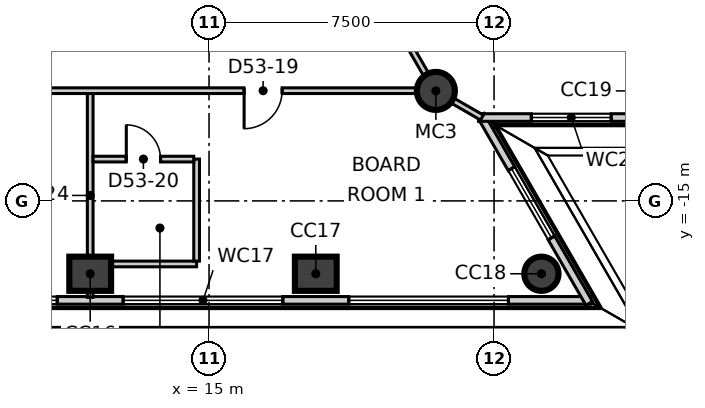
"""IFC4 building model, lengths in metres.
Left out: names, types, materials, properties, quantities, classifications, styles, units other than length and angle.
Written with IfcOpenShell. Run it as: python <this file> out.ifc"""

import sys

from ifc_helpers import new_model, si_unit, direction, frame, frame_2d, origin, origin_2d, place, context, subcontext, project, spatial, rectangle, circle, extrude, element, fill, save


model = new_model("IFC4")
c1 = context("Model", 3, precision=1e-05, world=origin(), true_north=direction((0.0, 1.0)))
c2 = subcontext(c1, "Body", "Model", "MODEL_VIEW")
j1 = project(units=[si_unit("LENGTHUNIT", "METRE"), si_unit("PLANEANGLEUNIT", "RADIAN")], contexts=[c1])
p1 = place(None, origin())
s1 = spatial("IfcSite", under=j1, at=p1, CompositionType="ELEMENT")
p2 = place(p1, origin())
s2 = spatial("IfcBuilding", under=s1, at=p2, CompositionType="ELEMENT")
p3 = place(p2, frame((0.0, 0.0, 227.3)))
s3 = spatial("IfcBuildingStorey", under=s2, at=p3, CompositionType="ELEMENT", Elevation=227.3)
for number, where, z_axis, x_axis in (
    (1, (11.873, -16.917, -0.3), (0.0, 0.0, 1.0), (1.0, 0.0, 0.0)),
    (2, (17.809, -16.917, -0.3), (0.0, 0.0, 1.0), (1.0, 0.0, 0.0)),
):
    element("IfcColumn", number, at=place(p3, frame(where, z_axis=z_axis, x_axis=x_axis)), inside=s3, PredefinedType="COLUMN", context=c2, shape_type="SweptSolid", body=[
        extrude(rectangle(XDim=1.1, YDim=0.9, at=origin_2d()), origin(), (0.0, 0.0, 1.0), 4.0),
    ])
p4 = place(p3, frame((23.746, -16.917, -0.3), z_axis=(0.0, 0.0, 1.0), x_axis=(1.0, 0.0, 0.0)))
e3 = element("IfcColumn", 3, at=p4, inside=s3, PredefinedType="COLUMN", context=c2, shape_type="SweptSolid", body=[
    extrude(circle(Radius=0.45, at=origin_2d()), origin(), (0.0, 0.0, 1.0), 4.0),
])
p5 = place(p3, frame((20.969, -12.106, -0.3), z_axis=(0.0, 0.0, 1.0), x_axis=(1.0, 0.0, 0.0)))
e4 = element("IfcColumn", 4, at=p5, inside=s3, PredefinedType="COLUMN", context=c2, shape_type="SweptSolid", body=[
    extrude(circle(Radius=0.5, at=origin_2d()), origin(), (0.0, 0.0, 1.0), 4.0),
])
p6 = place(p3, frame((-25.049, -17.617, 0.0), z_axis=(0.0, 0.0, 1.0), x_axis=(1.0, 0.0, 0.0)))
e5 = element("IfcWall", 5, at=p6, inside=s3, PredefinedType="ELEMENTEDWALL", context=c2, shape_type="SweptSolid", body=[
    extrude(rectangle(XDim=50.078, YDim=0.2, at=frame_2d((25.039, 0.0))), origin(), (0.0, 0.0, 1.0), 3.7),
])
p7 = place(p6, frame((2.171, 0.0, 0.9)))
e6 = element("IfcOpeningElement", 6, at=p7, cuts=e5, PredefinedType="OPENING", context=c2, shape_type="SweptSolid", body=[
    extrude(rectangle(XDim=4.2, YDim=2.5, at=frame_2d((2.1, 1.25))), frame((0.0, 0.11, 0.0), z_axis=(0.0, -1.0, 0.0), x_axis=(1.0, 0.0, 0.0)), (0.0, 0.0, 1.0), 0.22),
])
p8 = place(p6, frame((8.108, 0.0, 0.9)))
e7 = element("IfcOpeningElement", 7, at=p8, cuts=e5, PredefinedType="OPENING", context=c2, shape_type="SweptSolid", body=[
    extrude(rectangle(XDim=4.2, YDim=2.5, at=frame_2d((2.1, 1.25))), frame((0.0, 0.11, 0.0), z_axis=(0.0, -1.0, 0.0), x_axis=(1.0, 0.0, 0.0)), (0.0, 0.0, 1.0), 0.22),
])
p9 = place(p6, frame((14.044, 0.0, 0.9)))
e8 = element("IfcOpeningElement", 8, at=p9, cuts=e5, PredefinedType="OPENING", context=c2, shape_type="SweptSolid", body=[
    extrude(rectangle(XDim=4.2, YDim=2.5, at=frame_2d((2.1, 1.25))), frame((0.0, 0.11, 0.0), z_axis=(0.0, -1.0, 0.0), x_axis=(1.0, 0.0, 0.0)), (0.0, 0.0, 1.0), 0.22),
])
p10 = place(p6, frame((19.981, 0.0, 0.9)))
e9 = element("IfcOpeningElement", 9, at=p10, cuts=e5, PredefinedType="OPENING", context=c2, shape_type="SweptSolid", body=[
    extrude(rectangle(XDim=4.2, YDim=2.5, at=frame_2d((2.1, 1.25))), frame((0.0, 0.11, 0.0), z_axis=(0.0, -1.0, 0.0), x_axis=(1.0, 0.0, 0.0)), (0.0, 0.0, 1.0), 0.22),
])
p11 = place(p6, frame((25.917, 0.0, 0.9)))
e10 = element("IfcOpeningElement", 10, at=p11, cuts=e5, PredefinedType="OPENING", context=c2, shape_type="SweptSolid", body=[
    extrude(rectangle(XDim=4.2, YDim=2.5, at=frame_2d((2.1, 1.25))), frame((0.0, 0.11, 0.0), z_axis=(0.0, -1.0, 0.0), x_axis=(1.0, 0.0, 0.0)), (0.0, 0.0, 1.0), 0.22),
])
p12 = place(p6, frame((31.854, 0.0, 0.9)))
e11 = element("IfcOpeningElement", 11, at=p12, cuts=e5, PredefinedType="OPENING", context=c2, shape_type="SweptSolid", body=[
    extrude(rectangle(XDim=4.2, YDim=2.5, at=frame_2d((2.1, 1.25))), frame((0.0, 0.11, 0.0), z_axis=(0.0, -1.0, 0.0), x_axis=(1.0, 0.0, 0.0)), (0.0, 0.0, 1.0), 0.22),
])
p13 = place(p6, frame((37.79, 0.0, 0.9)))
e12 = element("IfcOpeningElement", 12, at=p13, cuts=e5, PredefinedType="OPENING", context=c2, shape_type="SweptSolid", body=[
    extrude(rectangle(XDim=4.2, YDim=2.5, at=frame_2d((2.1, 1.25))), frame((0.0, 0.11, 0.0), z_axis=(0.0, -1.0, 0.0), x_axis=(1.0, 0.0, 0.0)), (0.0, 0.0, 1.0), 0.22),
])
p14 = place(p6, frame((43.727, 0.0, 0.9)))
e13 = element("IfcOpeningElement", 13, at=p14, cuts=e5, PredefinedType="OPENING", context=c2, shape_type="SweptSolid", body=[
    extrude(rectangle(XDim=4.2, YDim=2.5, at=frame_2d((2.1, 1.25))), frame((0.0, 0.11, 0.0), z_axis=(0.0, -1.0, 0.0), x_axis=(1.0, 0.0, 0.0)), (0.0, 0.0, 1.0), 0.22),
])
p15 = place(p3, frame((25.004, -17.695, 0.0), z_axis=(0.0, 0.0, 1.0), x_axis=(-0.49987899677, 0.866095253761, 0.0)))
e14 = element("IfcWall", 14, at=p15, inside=s3, PredefinedType="ELEMENTEDWALL", context=c2, shape_type="SweptSolid", body=[
    extrude(rectangle(XDim=5.715, YDim=0.2, at=frame_2d((2.858, 0.0))), origin(), (0.0, 0.0, 1.0), 3.7),
])
p16 = place(p15, frame((1.99, 0.0, 0.9)))
e15 = element("IfcOpeningElement", 15, at=p16, cuts=e14, PredefinedType="OPENING", context=c2, shape_type="SweptSolid", body=[
    extrude(rectangle(XDim=2.1, YDim=2.5, at=frame_2d((1.05, 1.25))), frame((0.0, 0.11, 0.0), z_axis=(0.0, -1.0, 0.0), x_axis=(1.0, 0.0, 0.0)), (0.0, 0.0, 1.0), 0.22),
])
p17 = place(p3, frame((22.092, -12.806, 0.0), z_axis=(0.0, 0.0, 1.0), x_axis=(1.0, 0.0, 0.0)))
e16 = element("IfcWall", 16, at=p17, inside=s3, PredefinedType="ELEMENTEDWALL", context=c2, shape_type="SweptSolid", body=[
    extrude(rectangle(XDim=5.715, YDim=0.2, at=frame_2d((2.857, 0.0))), origin(), (0.0, 0.0, 1.0), 3.7),
])
p18 = place(p17, frame((1.39, 0.0, 0.9)))
e17 = element("IfcOpeningElement", 17, at=p18, cuts=e16, PredefinedType="OPENING", context=c2, shape_type="SweptSolid", body=[
    extrude(rectangle(XDim=2.1, YDim=2.5, at=frame_2d((1.05, 1.25))), frame((0.0, 0.11, 0.0), z_axis=(0.0, -1.0, 0.0), x_axis=(1.0, 0.0, 0.0)), (0.0, 0.0, 1.0), 0.22),
])
p19 = place(p3, frame((27.782, -12.884, 0.0), z_axis=(0.0, 0.0, 1.0), x_axis=(-0.500023345841, 0.866011924637, 0.0)))
e18 = element("IfcWall", 18, at=p19, inside=s3, PredefinedType="ELEMENTEDWALL", context=c2, shape_type="SweptSolid", body=[
    extrude(rectangle(XDim=50.078, YDim=0.2, at=frame_2d((25.039, 0.0))), origin(), (0.0, 0.0, 1.0), 3.7),
])
p20 = place(p19, frame((2.171, 0.0, 0.9)))
e19 = element("IfcOpeningElement", 19, at=p20, cuts=e18, PredefinedType="OPENING", context=c2, shape_type="SweptSolid", body=[
    extrude(rectangle(XDim=4.2, YDim=2.5, at=frame_2d((2.1, 1.25))), frame((0.0, 0.11, 0.0), z_axis=(0.0, -1.0, 0.0), x_axis=(1.0, 0.0, 0.0)), (0.0, 0.0, 1.0), 0.22),
])
p21 = place(p19, frame((8.108, 0.0, 0.9)))
e20 = element("IfcOpeningElement", 20, at=p21, cuts=e18, PredefinedType="OPENING", context=c2, shape_type="SweptSolid", body=[
    extrude(rectangle(XDim=4.2, YDim=2.5, at=frame_2d((2.1, 1.25))), frame((0.0, 0.11, 0.0), z_axis=(0.0, -1.0, 0.0), x_axis=(1.0, 0.0, 0.0)), (0.0, 0.0, 1.0), 0.22),
])
p22 = place(p19, frame((14.044, 0.0, 0.9)))
e21 = element("IfcOpeningElement", 21, at=p22, cuts=e18, PredefinedType="OPENING", context=c2, shape_type="SweptSolid", body=[
    extrude(rectangle(XDim=4.2, YDim=2.5, at=frame_2d((2.1, 1.25))), frame((0.0, 0.11, 0.0), z_axis=(0.0, -1.0, 0.0), x_axis=(1.0, 0.0, 0.0)), (0.0, 0.0, 1.0), 0.22),
])
p23 = place(p19, frame((19.981, 0.0, 0.9)))
e22 = element("IfcOpeningElement", 22, at=p23, cuts=e18, PredefinedType="OPENING", context=c2, shape_type="SweptSolid", body=[
    extrude(rectangle(XDim=4.2, YDim=2.5, at=frame_2d((2.1, 1.25))), frame((0.0, 0.11, 0.0), z_axis=(0.0, -1.0, 0.0), x_axis=(1.0, 0.0, 0.0)), (0.0, 0.0, 1.0), 0.22),
])
p24 = place(p19, frame((25.917, 0.0, 0.9)))
e23 = element("IfcOpeningElement", 23, at=p24, cuts=e18, PredefinedType="OPENING", context=c2, shape_type="SweptSolid", body=[
    extrude(rectangle(XDim=4.2, YDim=2.5, at=frame_2d((2.1, 1.25))), frame((0.0, 0.11, 0.0), z_axis=(0.0, -1.0, 0.0), x_axis=(1.0, 0.0, 0.0)), (0.0, 0.0, 1.0), 0.22),
])
p25 = place(p19, frame((31.854, 0.0, 0.9)))
e24 = element("IfcOpeningElement", 24, at=p25, cuts=e18, PredefinedType="OPENING", context=c2, shape_type="SweptSolid", body=[
    extrude(rectangle(XDim=4.2, YDim=2.5, at=frame_2d((2.1, 1.25))), frame((0.0, 0.11, 0.0), z_axis=(0.0, -1.0, 0.0), x_axis=(1.0, 0.0, 0.0)), (0.0, 0.0, 1.0), 0.22),
])
p26 = place(p19, frame((37.79, 0.0, 0.9)))
e25 = element("IfcOpeningElement", 25, at=p26, cuts=e18, PredefinedType="OPENING", context=c2, shape_type="SweptSolid", body=[
    extrude(rectangle(XDim=4.2, YDim=2.5, at=frame_2d((2.1, 1.25))), frame((0.0, 0.11, 0.0), z_axis=(0.0, -1.0, 0.0), x_axis=(1.0, 0.0, 0.0)), (0.0, 0.0, 1.0), 0.22),
])
p27 = place(p19, frame((43.727, 0.0, 0.9)))
e26 = element("IfcOpeningElement", 26, at=p27, cuts=e18, PredefinedType="OPENING", context=c2, shape_type="SweptSolid", body=[
    extrude(rectangle(XDim=4.2, YDim=2.5, at=frame_2d((2.1, 1.25))), frame((0.0, 0.11, 0.0), z_axis=(0.0, -1.0, 0.0), x_axis=(1.0, 0.0, 0.0)), (0.0, 0.0, 1.0), 0.22),
])
p28 = place(p3, frame((-20.808, -12.1, 0.0), z_axis=(0.0, 0.0, 1.0), x_axis=(1.0, 0.0, 0.0)))
e27 = element("IfcWall", 27, at=p28, inside=s3, PredefinedType="PARTITIONING", context=c2, shape_type="SweptSolid", body=[
    extrude(rectangle(XDim=41.766, YDim=0.15, at=frame_2d((20.883, 0.0))), origin(), (0.0, 0.0, 1.0), 3.7),
])
p29 = place(p28, frame((3.8, 0.0, 0.0)))
e28 = element("IfcOpeningElement", 28, at=p29, cuts=e27, PredefinedType="OPENING", context=c2, shape_type="SweptSolid", body=[
    extrude(rectangle(XDim=1.1, YDim=2.1, at=frame_2d((0.55, 1.05))), frame((0.0, 0.085, 0.0), z_axis=(0.0, -1.0, 0.0), x_axis=(1.0, 0.0, 0.0)), (0.0, 0.0, 1.0), 0.17),
])
p30 = place(p28, frame((18.685, 0.0, 0.0)))
e29 = element("IfcOpeningElement", 29, at=p30, cuts=e27, PredefinedType="OPENING", context=c2, shape_type="SweptSolid", body=[
    extrude(rectangle(XDim=1.1, YDim=2.1, at=frame_2d((0.55, 1.05))), frame((0.0, 0.085, 0.0), z_axis=(0.0, -1.0, 0.0), x_axis=(1.0, 0.0, 0.0)), (0.0, 0.0, 1.0), 0.17),
])
p31 = place(p28, frame((10.085, 0.0, 0.0)))
e30 = element("IfcOpeningElement", 30, at=p31, cuts=e27, PredefinedType="OPENING", context=c2, shape_type="SweptSolid", body=[
    extrude(rectangle(XDim=0.9, YDim=2.1, at=frame_2d((0.45, 1.05))), frame((0.0, 0.085, 0.0), z_axis=(0.0, -1.0, 0.0), x_axis=(1.0, 0.0, 0.0)), (0.0, 0.0, 1.0), 0.17),
])
p32 = place(p28, frame((13.285, 0.0, 0.0)))
e31 = element("IfcOpeningElement", 31, at=p32, cuts=e27, PredefinedType="OPENING", context=c2, shape_type="SweptSolid", body=[
    extrude(rectangle(XDim=0.9, YDim=2.1, at=frame_2d((0.45, 1.05))), frame((0.0, 0.085, 0.0), z_axis=(0.0, -1.0, 0.0), x_axis=(1.0, 0.0, 0.0)), (0.0, 0.0, 1.0), 0.17),
])
p33 = place(p28, frame((15.985, 0.0, 0.0)))
e32 = element("IfcOpeningElement", 32, at=p33, cuts=e27, PredefinedType="OPENING", context=c2, shape_type="SweptSolid", body=[
    extrude(rectangle(XDim=1.0, YDim=2.1, at=frame_2d((0.5, 1.05))), frame((0.0, 0.085, 0.0), z_axis=(0.0, -1.0, 0.0), x_axis=(1.0, 0.0, 0.0)), (0.0, 0.0, 1.0), 0.17),
])
p34 = place(p28, frame((29.158, 0.0, 0.0)))
e33 = element("IfcOpeningElement", 33, at=p34, cuts=e27, PredefinedType="OPENING", context=c2, shape_type="SweptSolid", body=[
    extrude(rectangle(XDim=1.1, YDim=2.1, at=frame_2d((0.55, 1.05))), frame((0.0, 0.085, 0.0), z_axis=(0.0, -1.0, 0.0), x_axis=(1.0, 0.0, 0.0)), (0.0, 0.0, 1.0), 0.17),
])
p35 = place(p28, frame((22.158, 0.0, 0.0)))
e34 = element("IfcOpeningElement", 34, at=p35, cuts=e27, PredefinedType="OPENING", context=c2, shape_type="SweptSolid", body=[
    extrude(rectangle(XDim=0.9, YDim=2.1, at=frame_2d((0.45, 1.05))), frame((0.0, 0.085, 0.0), z_axis=(0.0, -1.0, 0.0), x_axis=(1.0, 0.0, 0.0)), (0.0, 0.0, 1.0), 0.17),
])
p36 = place(p28, frame((25.158, 0.0, 0.0)))
e35 = element("IfcOpeningElement", 35, at=p36, cuts=e27, PredefinedType="OPENING", context=c2, shape_type="SweptSolid", body=[
    extrude(rectangle(XDim=0.9, YDim=2.1, at=frame_2d((0.45, 1.05))), frame((0.0, 0.085, 0.0), z_axis=(0.0, -1.0, 0.0), x_axis=(1.0, 0.0, 0.0)), (0.0, 0.0, 1.0), 0.17),
])
p37 = place(p28, frame((36.731, 0.0, 0.0)))
e36 = element("IfcOpeningElement", 36, at=p37, cuts=e27, PredefinedType="OPENING", context=c2, shape_type="SweptSolid", body=[
    extrude(rectangle(XDim=1.0, YDim=2.1, at=frame_2d((0.5, 1.05))), frame((0.0, 0.085, 0.0), z_axis=(0.0, -1.0, 0.0), x_axis=(1.0, 0.0, 0.0)), (0.0, 0.0, 1.0), 0.17),
])
p38 = place(p3, frame((21.086, -12.175, 0.0), z_axis=(0.0, 0.0, 1.0), x_axis=(0.866143786764, -0.499794898583, 0.0)))
e37 = element("IfcWall", 37, at=p38, inside=s3, PredefinedType="PARTITIONING", context=c2, shape_type="SweptSolid", body=[
    extrude(rectangle(XDim=1.264, YDim=0.15, at=frame_2d((0.632, 0.0))), origin(), (0.0, 0.0, 1.0), 3.7),
])
p39 = place(p3, frame((0.075, 24.07, 0.0), z_axis=(0.0, 0.0, 1.0), x_axis=(0.49999939571, -0.866025752671, 0.0)))
e38 = element("IfcWall", 38, at=p39, inside=s3, PredefinedType="PARTITIONING", context=c2, shape_type="SweptSolid", body=[
    extrude(rectangle(XDim=41.614, YDim=0.15, at=frame_2d((20.807, 0.0))), origin(), (0.0, 0.0, 1.0), 3.7),
])
p40 = place(p39, frame((36.714, 0.0, 0.0)))
e39 = element("IfcOpeningElement", 39, at=p40, cuts=e38, PredefinedType="OPENING", context=c2, shape_type="SweptSolid", body=[
    extrude(rectangle(XDim=1.1, YDim=2.1, at=frame_2d((0.55, 1.05))), frame((0.0, 0.085, 0.0), z_axis=(0.0, -1.0, 0.0), x_axis=(1.0, 0.0, 0.0)), (0.0, 0.0, 1.0), 0.17),
])
p41 = place(p39, frame((21.831, 0.0, 0.0)))
e40 = element("IfcOpeningElement", 40, at=p41, cuts=e38, PredefinedType="OPENING", context=c2, shape_type="SweptSolid", body=[
    extrude(rectangle(XDim=1.1, YDim=2.1, at=frame_2d((0.55, 1.05))), frame((0.0, 0.085, 0.0), z_axis=(0.0, -1.0, 0.0), x_axis=(1.0, 0.0, 0.0)), (0.0, 0.0, 1.0), 0.17),
])
p42 = place(p39, frame((30.631, 0.0, 0.0)))
e41 = element("IfcOpeningElement", 41, at=p42, cuts=e38, PredefinedType="OPENING", context=c2, shape_type="SweptSolid", body=[
    extrude(rectangle(XDim=0.9, YDim=2.1, at=frame_2d((0.45, 1.05))), frame((0.0, 0.085, 0.0), z_axis=(0.0, -1.0, 0.0), x_axis=(1.0, 0.0, 0.0)), (0.0, 0.0, 1.0), 0.17),
])
p43 = place(p39, frame((27.431, 0.0, 0.0)))
e42 = element("IfcOpeningElement", 42, at=p43, cuts=e38, PredefinedType="OPENING", context=c2, shape_type="SweptSolid", body=[
    extrude(rectangle(XDim=0.9, YDim=2.1, at=frame_2d((0.45, 1.05))), frame((0.0, 0.085, 0.0), z_axis=(0.0, -1.0, 0.0), x_axis=(1.0, 0.0, 0.0)), (0.0, 0.0, 1.0), 0.17),
])
p44 = place(p39, frame((24.631, 0.0, 0.0)))
e43 = element("IfcOpeningElement", 43, at=p44, cuts=e38, PredefinedType="OPENING", context=c2, shape_type="SweptSolid", body=[
    extrude(rectangle(XDim=1.0, YDim=2.1, at=frame_2d((0.5, 1.05))), frame((0.0, 0.085, 0.0), z_axis=(0.0, -1.0, 0.0), x_axis=(1.0, 0.0, 0.0)), (0.0, 0.0, 1.0), 0.17),
])
p45 = place(p39, frame((14.358, 0.0, 0.0)))
e44 = element("IfcOpeningElement", 44, at=p45, cuts=e38, PredefinedType="OPENING", context=c2, shape_type="SweptSolid", body=[
    extrude(rectangle(XDim=1.1, YDim=2.1, at=frame_2d((0.55, 1.05))), frame((0.0, 0.085, 0.0), z_axis=(0.0, -1.0, 0.0), x_axis=(1.0, 0.0, 0.0)), (0.0, 0.0, 1.0), 0.17),
])
p46 = place(p39, frame((3.885, 0.0, 0.0)))
e45 = element("IfcOpeningElement", 45, at=p46, cuts=e38, PredefinedType="OPENING", context=c2, shape_type="SweptSolid", body=[
    extrude(rectangle(XDim=1.1, YDim=2.1, at=frame_2d((0.55, 1.05))), frame((0.0, 0.085, 0.0), z_axis=(0.0, -1.0, 0.0), x_axis=(1.0, 0.0, 0.0)), (0.0, 0.0, 1.0), 0.17),
])
p47 = place(p3, frame((11.873, -17.537, 0.0), z_axis=(0.0, 0.0, 1.0), x_axis=(0.0, 1.0, 0.0)))
e46 = element("IfcWall", 46, at=p47, inside=s3, PredefinedType="PARTITIONING", context=c2, shape_type="SweptSolid", body=[
    extrude(rectangle(XDim=5.362, YDim=0.15, at=frame_2d((2.681, 0.0))), origin(), (0.0, 0.0, 1.0), 3.7),
])
p48 = place(p3, frame((11.948, -16.659, 0.0), z_axis=(0.0, 0.0, 1.0), x_axis=(1.0, 0.0, 0.0)))
e47 = element("IfcWall", 47, at=p48, inside=s3, PredefinedType="PARTITIONING", context=c2, shape_type="SweptSolid", body=[
    extrude(rectangle(XDim=2.725, YDim=0.15, at=frame_2d((1.363, 0.0))), origin(), (0.0, 0.0, 1.0), 2.95),
])
p49 = place(p3, frame((14.673, -16.584, 0.0), z_axis=(0.0, 0.0, 1.0), x_axis=(0.0, 1.0, 0.0)))
e48 = element("IfcWall", 48, at=p49, inside=s3, PredefinedType="PARTITIONING", context=c2, shape_type="SweptSolid", body=[
    extrude(rectangle(XDim=2.684, YDim=0.15, at=frame_2d((1.342, 0.0))), origin(), (0.0, 0.0, 1.0), 3.7),
])
p50 = place(p3, frame((11.948, -13.9, 0.0), z_axis=(0.0, 0.0, 1.0), x_axis=(1.0, 0.0, 0.0)))
e49 = element("IfcWall", 49, at=p50, inside=s3, PredefinedType="PARTITIONING", context=c2, shape_type="SweptSolid", body=[
    extrude(rectangle(XDim=2.65, YDim=0.15, at=frame_2d((1.325, 0.0))), origin(), (0.0, 0.0, 1.0), 3.7),
])
p51 = place(p50, frame((0.875, 0.0, 0.0)))
e50 = element("IfcOpeningElement", 50, at=p51, cuts=e49, PredefinedType="OPENING", context=c2, shape_type="SweptSolid", body=[
    extrude(rectangle(XDim=0.9, YDim=2.1, at=frame_2d((0.45, 1.05))), frame((0.0, 0.085, 0.0), z_axis=(0.0, -1.0, 0.0), x_axis=(1.0, 0.0, 0.0)), (0.0, 0.0, 1.0), 0.17),
])
p52 = place(p12, origin())
e51 = element("IfcWindow", 51, at=p52, inside=s3, PartitioningType="SINGLE_PANEL", PredefinedType="WINDOW", context=c2, shape_type="SweptSolid", body=[
    extrude(rectangle(XDim=4.2, YDim=2.5, at=frame_2d((2.1, 1.25))), frame((0.0, 0.03, 0.0), z_axis=(0.0, -1.0, 0.0), x_axis=(1.0, 0.0, 0.0)), (0.0, 0.0, 1.0), 0.06),
])
fill(e11, e51)
p53 = place(p13, origin())
e52 = element("IfcWindow", 52, at=p53, inside=s3, PartitioningType="SINGLE_PANEL", PredefinedType="WINDOW", context=c2, shape_type="SweptSolid", body=[
    extrude(rectangle(XDim=4.2, YDim=2.5, at=frame_2d((2.1, 1.25))), frame((0.0, 0.03, 0.0), z_axis=(0.0, -1.0, 0.0), x_axis=(1.0, 0.0, 0.0)), (0.0, 0.0, 1.0), 0.06),
])
fill(e12, e52)
p54 = place(p14, origin())
e53 = element("IfcWindow", 53, at=p54, inside=s3, PartitioningType="SINGLE_PANEL", PredefinedType="WINDOW", context=c2, shape_type="SweptSolid", body=[
    extrude(rectangle(XDim=4.2, YDim=2.5, at=frame_2d((2.1, 1.25))), frame((0.0, 0.03, 0.0), z_axis=(0.0, -1.0, 0.0), x_axis=(1.0, 0.0, 0.0)), (0.0, 0.0, 1.0), 0.06),
])
fill(e13, e53)
p55 = place(p16, origin())
e54 = element("IfcWindow", 54, at=p55, inside=s3, PartitioningType="SINGLE_PANEL", PredefinedType="WINDOW", context=c2, shape_type="SweptSolid", body=[
    extrude(rectangle(XDim=2.1, YDim=2.5, at=frame_2d((1.05, 1.25))), frame((0.0, 0.03, 0.0), z_axis=(0.0, -1.0, 0.0), x_axis=(1.0, 0.0, 0.0)), (0.0, 0.0, 1.0), 0.06),
])
fill(e15, e54)
p56 = place(p18, origin())
e55 = element("IfcWindow", 55, at=p56, inside=s3, PartitioningType="SINGLE_PANEL", PredefinedType="WINDOW", context=c2, shape_type="SweptSolid", body=[
    extrude(rectangle(XDim=2.1, YDim=2.5, at=frame_2d((1.05, 1.25))), frame((0.0, 0.03, 0.0), z_axis=(0.0, -1.0, 0.0), x_axis=(1.0, 0.0, 0.0)), (0.0, 0.0, 1.0), 0.06),
])
fill(e17, e55)
p57 = place(p37, origin())
e56 = element("IfcDoor", 56, at=p57, inside=s3, OperationType="SINGLE_SWING_LEFT", PredefinedType="DOOR", context=c2, shape_type="SweptSolid", body=[
    extrude(rectangle(XDim=1.0, YDim=2.1, at=frame_2d((0.5, 1.05))), frame((0.0, 0.025, 0.0), z_axis=(0.0, -1.0, 0.0), x_axis=(1.0, 0.0, 0.0)), (0.0, 0.0, 1.0), 0.05),
])
fill(e36, e56)
p58 = place(p51, origin())
e57 = element("IfcDoor", 57, at=p58, inside=s3, OperationType="SINGLE_SWING_RIGHT", PredefinedType="DOOR", context=c2, shape_type="SweptSolid", body=[
    extrude(rectangle(XDim=0.9, YDim=2.1, at=frame_2d((0.45, 1.05))), frame((0.0, 0.025, 0.0), z_axis=(0.0, -1.0, 0.0), x_axis=(1.0, 0.0, 0.0)), (0.0, 0.0, 1.0), 0.05),
])
fill(e50, e57)
save(model, sys.argv[1])
